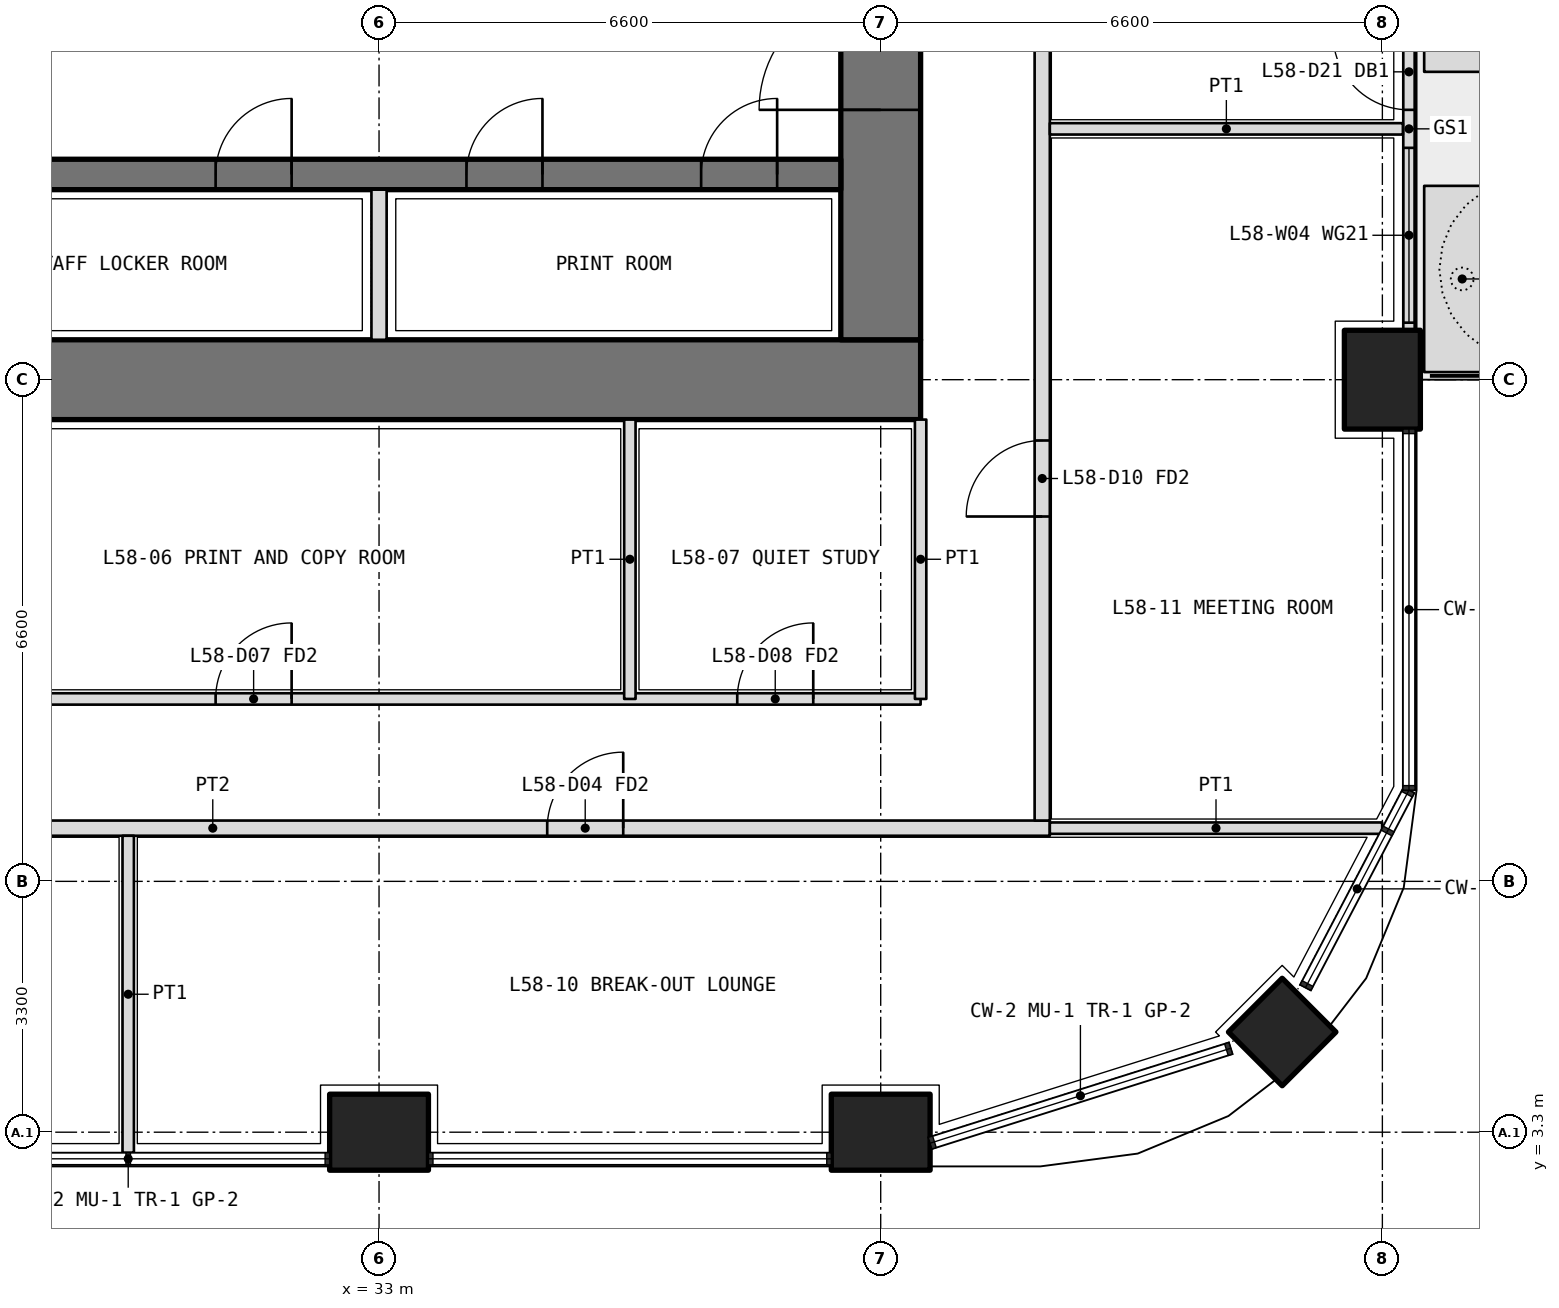
"""IFC4 building model, lengths in metres.
Left out: names, types, materials, properties, quantities, classifications, styles, units other than length and angle.
Written with IfcOpenShell. Run it as: python <this file> out.ifc"""

import sys

from ifc_helpers import new_model, si_unit, direction, frame, frame_2d, origin, origin_2d, place, context, subcontext, project, spatial, polyline, rectangle, outline, extrude, element, fill, save


model = new_model("IFC4")
c1 = context("Model", 3, precision=1e-05, world=origin(), true_north=direction((0.0, 1.0)))
c2 = subcontext(c1, "Body", "Model", "MODEL_VIEW")
j1 = project(units=[si_unit("LENGTHUNIT", "METRE"), si_unit("PLANEANGLEUNIT", "RADIAN")], contexts=[c1])
p1 = place(None, origin())
s1 = spatial("IfcSite", under=j1, at=p1, CompositionType="ELEMENT")
p2 = place(p1, origin())
s2 = spatial("IfcBuilding", under=s1, at=p2, CompositionType="ELEMENT")
p3 = place(p2, frame((0.0, 0.0, 254.4)))
s3 = spatial("IfcBuildingStorey", under=s2, at=p3, CompositionType="ELEMENT", Elevation=254.4)
p4 = place(p3, frame((44.882, 4.618, 0.0), z_axis=(0.0, 0.0, 1.0), x_axis=(0.707106781187, 0.707106781187, 0.0)))
e1 = element("IfcColumn", 1, at=p4, inside=s3, PredefinedType="COLUMN", context=c2, shape_type="SweptSolid", body=[
    extrude(rectangle(XDim=1.0, YDim=1.0, at=origin_2d()), origin(), (0.0, 0.0, 1.0), 4.2),
])
for number, where, z_axis, x_axis in (
    (2, (33.0, 3.3, 0.0), (0.0, 0.0, 1.0), (1.0, 0.0, 0.0)),
    (3, (39.6, 3.3, 0.0), (0.0, 0.0, 1.0), (1.0, 0.0, 0.0)),
    (4, (46.2, 13.2, 0.0), (0.0, 0.0, 1.0), (0.0, 1.0, 0.0)),
):
    element("IfcColumn", number, at=place(p3, frame(where, z_axis=z_axis, x_axis=x_axis)), inside=s3, PredefinedType="COLUMN", context=c2, shape_type="SweptSolid", body=[
        extrude(rectangle(XDim=1.3, YDim=1.0, at=origin_2d()), origin(), (0.0, 0.0, 1.0), 4.2),
    ])
p5 = place(p3, origin())
e5 = element("IfcWall", 5, at=p5, inside=s3, PredefinedType="USERDEFINED", context=c2, shape_type="SweptSolid", body=[
    extrude(outline(polyline([(46.75, 13.3), (47.75, 13.3), (47.75, 15.75), (46.75, 15.75), (46.75, 13.3)]), holes=[polyline([(46.9, 13.45), (47.6, 13.45), (47.6, 15.6), (46.9, 15.6), (46.9, 13.45)])]), origin(), (0.0, 0.0, 1.0), 1.05),
])
p6 = place(p3, origin())
e6 = element("IfcWall", 6, at=p6, inside=s3, PredefinedType="USERDEFINED", context=c2, shape_type="SweptSolid", body=[
    extrude(outline(polyline([(46.75, 17.25), (47.75, 17.25), (47.75, 26.3), (46.75, 26.3), (46.75, 17.25)]), holes=[polyline([(46.9, 17.4), (47.6, 17.4), (47.6, 26.15), (46.9, 26.15), (46.9, 17.4)])]), origin(), (0.0, 0.0, 1.0), 1.05),
])
p7 = place(p3, frame((46.55, 13.85, 0.0), z_axis=(0.0, 0.0, 1.0), x_axis=(0.0, 1.0, 0.0)))
e7 = element("IfcWall", 7, at=p7, inside=s3, PredefinedType="SOLIDWALL", context=c2, shape_type="SweptSolid", body=[
    extrude(rectangle(XDim=5.3, YDim=0.15, at=frame_2d((2.65, 0.0))), origin(), (0.0, 0.0, 1.0), 2.7),
])
p8 = place(p7, frame((2.9, 0.0, 0.0)))
e8 = element("IfcOpeningElement", 8, at=p8, cuts=e7, PredefinedType="OPENING", context=c2, shape_type="SweptSolid", body=[
    extrude(rectangle(XDim=1.0, YDim=2.4, at=frame_2d((0.5, 1.2))), frame((0.0, 0.085, 0.0), z_axis=(0.0, -1.0, 0.0), x_axis=(1.0, 0.0, 0.0)), (0.0, 0.0, 1.0), 0.17),
])
p9 = place(p7, frame((0.1, 0.0, 0.1)))
e9 = element("IfcOpeningElement", 9, at=p9, cuts=e7, PredefinedType="OPENING", context=c2, shape_type="SweptSolid", body=[
    extrude(rectangle(XDim=2.3, YDim=2.3, at=frame_2d((1.15, 1.15))), frame((0.0, 0.085, 0.0), z_axis=(0.0, -1.0, 0.0), x_axis=(1.0, 0.0, 0.0)), (0.0, 0.0, 1.0), 0.17),
])
p10 = place(p7, frame((4.0, 0.0, 0.1)))
e10 = element("IfcOpeningElement", 10, at=p10, cuts=e7, PredefinedType="OPENING", context=c2, shape_type="SweptSolid", body=[
    extrude(rectangle(XDim=1.2, YDim=2.3, at=frame_2d((0.6, 1.15))), frame((0.0, 0.085, 0.0), z_axis=(0.0, -1.0, 0.0), x_axis=(1.0, 0.0, 0.0)), (0.0, 0.0, 1.0), 0.17),
])
p11 = place(p3, frame((12.675, 13.2, 0.0), z_axis=(0.0, 0.0, 1.0), x_axis=(1.0, 0.0, 0.0)))
e11 = element("IfcWall", 11, at=p11, inside=s3, PredefinedType="SHEAR", context=c2, shape_type="SweptSolid", body=[
    extrude(rectangle(XDim=27.45, YDim=1.05, at=frame_2d((13.725, 0.0))), origin(), (0.0, 0.0, 1.0), 4.2),
])
p12 = place(p3, frame((39.6, 13.725, 0.0), z_axis=(0.0, 0.0, 1.0), x_axis=(0.0, 1.0, 0.0)))
e12 = element("IfcWall", 12, at=p12, inside=s3, PredefinedType="SHEAR", context=c2, shape_type="SweptSolid", body=[
    extrude(rectangle(XDim=18.75, YDim=1.05, at=frame_2d((9.375, 0.0))), origin(), (0.0, 0.0, 1.0), 4.2),
])
p13 = place(p12, frame((3.025, 0.0, 0.0)))
e13 = element("IfcOpeningElement", 13, at=p13, cuts=e12, PredefinedType="OPENING", context=c2, shape_type="SweptSolid", body=[
    extrude(rectangle(XDim=1.6, YDim=2.1, at=frame_2d((0.8, 1.05))), frame((0.0, 0.535, 0.0), z_axis=(0.0, -1.0, 0.0), x_axis=(1.0, 0.0, 0.0)), (0.0, 0.0, 1.0), 1.07),
])
p14 = place(p12, frame((13.825, 0.0, 0.0)))
e14 = element("IfcOpeningElement", 14, at=p14, cuts=e12, PredefinedType="OPENING", context=c2, shape_type="SweptSolid", body=[
    extrude(rectangle(XDim=1.6, YDim=2.1, at=frame_2d((0.8, 1.05))), frame((0.0, 0.535, 0.0), z_axis=(0.0, -1.0, 0.0), x_axis=(1.0, 0.0, 0.0)), (0.0, 0.0, 1.0), 1.07),
])
p15 = place(p3, frame((13.725, 15.9, 0.0), z_axis=(0.0, 0.0, 1.0), x_axis=(1.0, 0.0, 0.0)))
e15 = element("IfcWall", 15, at=p15, inside=s3, PredefinedType="SHEAR", context=c2, shape_type="SweptSolid", body=[
    extrude(rectangle(XDim=25.35, YDim=0.4, at=frame_2d((12.675, 0.0))), origin(), (0.0, 0.0, 1.0), 4.2),
])
p16 = place(p15, frame((0.837, 0.0, 0.0)))
e16 = element("IfcOpeningElement", 16, at=p16, cuts=e15, PredefinedType="OPENING", context=c2, shape_type="SweptSolid", body=[
    extrude(rectangle(XDim=1.0, YDim=2.1, at=frame_2d((0.5, 1.05))), frame((0.0, 0.21, 0.0), z_axis=(0.0, -1.0, 0.0), x_axis=(1.0, 0.0, 0.0)), (0.0, 0.0, 1.0), 0.42),
])
p17 = place(p15, frame((3.925, 0.0, 0.0)))
e17 = element("IfcOpeningElement", 17, at=p17, cuts=e15, PredefinedType="OPENING", context=c2, shape_type="SweptSolid", body=[
    extrude(rectangle(XDim=1.0, YDim=2.1, at=frame_2d((0.5, 1.05))), frame((0.0, 0.21, 0.0), z_axis=(0.0, -1.0, 0.0), x_axis=(1.0, 0.0, 0.0)), (0.0, 0.0, 1.0), 0.42),
])
p18 = place(p15, frame((7.225, 0.0, 0.0)))
e18 = element("IfcOpeningElement", 18, at=p18, cuts=e15, PredefinedType="OPENING", context=c2, shape_type="SweptSolid", body=[
    extrude(rectangle(XDim=1.0, YDim=2.1, at=frame_2d((0.5, 1.05))), frame((0.0, 0.21, 0.0), z_axis=(0.0, -1.0, 0.0), x_axis=(1.0, 0.0, 0.0)), (0.0, 0.0, 1.0), 0.42),
])
p19 = place(p15, frame((10.525, 0.0, 0.0)))
e19 = element("IfcOpeningElement", 19, at=p19, cuts=e15, PredefinedType="OPENING", context=c2, shape_type="SweptSolid", body=[
    extrude(rectangle(XDim=1.0, YDim=2.1, at=frame_2d((0.5, 1.05))), frame((0.0, 0.21, 0.0), z_axis=(0.0, -1.0, 0.0), x_axis=(1.0, 0.0, 0.0)), (0.0, 0.0, 1.0), 0.42),
])
p20 = place(p15, frame((13.825, 0.0, 0.0)))
e20 = element("IfcOpeningElement", 20, at=p20, cuts=e15, PredefinedType="OPENING", context=c2, shape_type="SweptSolid", body=[
    extrude(rectangle(XDim=1.0, YDim=2.1, at=frame_2d((0.5, 1.05))), frame((0.0, 0.21, 0.0), z_axis=(0.0, -1.0, 0.0), x_axis=(1.0, 0.0, 0.0)), (0.0, 0.0, 1.0), 0.42),
])
p21 = place(p15, frame((17.125, 0.0, 0.0)))
e21 = element("IfcOpeningElement", 21, at=p21, cuts=e15, PredefinedType="OPENING", context=c2, shape_type="SweptSolid", body=[
    extrude(rectangle(XDim=1.0, YDim=2.1, at=frame_2d((0.5, 1.05))), frame((0.0, 0.21, 0.0), z_axis=(0.0, -1.0, 0.0), x_axis=(1.0, 0.0, 0.0)), (0.0, 0.0, 1.0), 0.42),
])
p22 = place(p15, frame((20.425, 0.0, 0.0)))
e22 = element("IfcOpeningElement", 22, at=p22, cuts=e15, PredefinedType="OPENING", context=c2, shape_type="SweptSolid", body=[
    extrude(rectangle(XDim=1.0, YDim=2.1, at=frame_2d((0.5, 1.05))), frame((0.0, 0.21, 0.0), z_axis=(0.0, -1.0, 0.0), x_axis=(1.0, 0.0, 0.0)), (0.0, 0.0, 1.0), 0.42),
])
p23 = place(p15, frame((23.512, 0.0, 0.0)))
e23 = element("IfcOpeningElement", 23, at=p23, cuts=e15, PredefinedType="OPENING", context=c2, shape_type="SweptSolid", body=[
    extrude(rectangle(XDim=1.0, YDim=2.1, at=frame_2d((0.5, 1.05))), frame((0.0, 0.21, 0.0), z_axis=(0.0, -1.0, 0.0), x_axis=(1.0, 0.0, 0.0)), (0.0, 0.0, 1.0), 0.42),
])
p24 = place(p3, frame((33.0, 13.725, 0.0), z_axis=(0.0, 0.0, 1.0), x_axis=(0.0, 1.0, 0.0)))
e24 = element("IfcWall", 24, at=p24, inside=s3, PredefinedType="PARTITIONING", context=c2, shape_type="SweptSolid", body=[
    extrude(rectangle(XDim=1.975, YDim=0.2, at=frame_2d((0.987, 0.0))), origin(), (0.0, 0.0, 1.0), 4.2),
])
p25 = place(p3, frame((12.675, 9.0, 0.0), z_axis=(0.0, 0.0, 1.0), x_axis=(1.0, 0.0, 0.0)))
e25 = element("IfcWall", 25, at=p25, inside=s3, PredefinedType="PARTITIONING", context=c2, shape_type="SweptSolid", body=[
    extrude(rectangle(XDim=27.45, YDim=0.15, at=frame_2d((13.725, 0.0))), origin(), (0.0, 0.0, 1.0), 3.0),
])
p26 = place(p25, frame((4.712, 0.0, 0.0)))
e26 = element("IfcOpeningElement", 26, at=p26, cuts=e25, PredefinedType="OPENING", context=c2, shape_type="SweptSolid", body=[
    extrude(rectangle(XDim=1.0, YDim=2.1, at=frame_2d((0.5, 1.05))), frame((0.0, 0.085, 0.0), z_axis=(0.0, -1.0, 0.0), x_axis=(1.0, 0.0, 0.0)), (0.0, 0.0, 1.0), 0.17),
])
p27 = place(p25, frame((11.575, 0.0, 0.0)))
e27 = element("IfcOpeningElement", 27, at=p27, cuts=e25, PredefinedType="OPENING", context=c2, shape_type="SweptSolid", body=[
    extrude(rectangle(XDim=1.0, YDim=2.1, at=frame_2d((0.5, 1.05))), frame((0.0, 0.085, 0.0), z_axis=(0.0, -1.0, 0.0), x_axis=(1.0, 0.0, 0.0)), (0.0, 0.0, 1.0), 0.17),
])
p28 = place(p25, frame((18.175, 0.0, 0.0)))
e28 = element("IfcOpeningElement", 28, at=p28, cuts=e25, PredefinedType="OPENING", context=c2, shape_type="SweptSolid", body=[
    extrude(rectangle(XDim=1.0, YDim=2.1, at=frame_2d((0.5, 1.05))), frame((0.0, 0.085, 0.0), z_axis=(0.0, -1.0, 0.0), x_axis=(1.0, 0.0, 0.0)), (0.0, 0.0, 1.0), 0.17),
])
p29 = place(p25, frame((25.038, 0.0, 0.0)))
e29 = element("IfcOpeningElement", 29, at=p29, cuts=e25, PredefinedType="OPENING", context=c2, shape_type="SweptSolid", body=[
    extrude(rectangle(XDim=1.0, YDim=2.1, at=frame_2d((0.5, 1.05))), frame((0.0, 0.085, 0.0), z_axis=(0.0, -1.0, 0.0), x_axis=(1.0, 0.0, 0.0)), (0.0, 0.0, 1.0), 0.17),
])
p30 = place(p3, frame((40.125, 12.675, 0.0), z_axis=(0.0, 0.0, 1.0), x_axis=(0.0, -1.0, 0.0)))
e30 = element("IfcWall", 30, at=p30, inside=s3, PredefinedType="PARTITIONING", context=c2, shape_type="SweptSolid", body=[
    extrude(rectangle(XDim=3.675, YDim=0.15, at=frame_2d((1.837, 0.0))), origin(), (0.0, 0.0, 1.0), 3.0),
])
p31 = place(p3, frame((36.3, 12.675, 0.0), z_axis=(0.0, 0.0, 1.0), x_axis=(0.0, -1.0, 0.0)))
e31 = element("IfcWall", 31, at=p31, inside=s3, PredefinedType="PARTITIONING", context=c2, shape_type="SweptSolid", body=[
    extrude(rectangle(XDim=3.675, YDim=0.15, at=frame_2d((1.837, 0.0))), origin(), (0.0, 0.0, 1.0), 3.9),
])
p32 = place(p3, frame((19.8, 7.3, 0.0), z_axis=(0.0, 0.0, 1.0), x_axis=(1.0, 0.0, 0.0)))
e32 = element("IfcWall", 32, at=p32, inside=s3, PredefinedType="PARTITIONING", context=c2, shape_type="SweptSolid", body=[
    extrude(rectangle(XDim=22.025, YDim=0.2, at=frame_2d((11.012, 0.0))), origin(), (0.0, 0.0, 1.0), 3.0),
])
p33 = place(p32, frame((4.35, 0.0, 0.0)))
e33 = element("IfcOpeningElement", 33, at=p33, cuts=e32, PredefinedType="OPENING", context=c2, shape_type="SweptSolid", body=[
    extrude(rectangle(XDim=1.2, YDim=2.1, at=frame_2d((0.6, 1.05))), frame((0.0, 0.11, 0.0), z_axis=(0.0, -1.0, 0.0), x_axis=(1.0, 0.0, 0.0)), (0.0, 0.0, 1.0), 0.22),
])
p34 = place(p32, frame((15.413, 0.0, 0.0)))
e34 = element("IfcOpeningElement", 34, at=p34, cuts=e32, PredefinedType="OPENING", context=c2, shape_type="SweptSolid", body=[
    extrude(rectangle(XDim=1.0, YDim=2.1, at=frame_2d((0.5, 1.05))), frame((0.0, 0.11, 0.0), z_axis=(0.0, -1.0, 0.0), x_axis=(1.0, 0.0, 0.0)), (0.0, 0.0, 1.0), 0.22),
])
p35 = place(p3, frame((41.725, 7.4, 0.0), z_axis=(0.0, 0.0, 1.0), x_axis=(0.0, 1.0, 0.0)))
e35 = element("IfcWall", 35, at=p35, inside=s3, PredefinedType="PARTITIONING", context=c2, shape_type="SweptSolid", body=[
    extrude(rectangle(XDim=31.4, YDim=0.2, at=frame_2d((15.7, 0.0))), origin(), (0.0, 0.0, 1.0), 3.0),
])
p36 = place(p35, frame((4.0, 0.0, 0.0)))
e36 = element("IfcOpeningElement", 36, at=p36, cuts=e35, PredefinedType="OPENING", context=c2, shape_type="SweptSolid", body=[
    extrude(rectangle(XDim=1.0, YDim=2.1, at=frame_2d((0.5, 1.05))), frame((0.0, 0.11, 0.0), z_axis=(0.0, -1.0, 0.0), x_axis=(1.0, 0.0, 0.0)), (0.0, 0.0, 1.0), 0.22),
])
p37 = place(p35, frame((10.25, 0.0, 0.0)))
e37 = element("IfcOpeningElement", 37, at=p37, cuts=e35, PredefinedType="OPENING", context=c2, shape_type="SweptSolid", body=[
    extrude(rectangle(XDim=1.0, YDim=2.1, at=frame_2d((0.5, 1.05))), frame((0.0, 0.11, 0.0), z_axis=(0.0, -1.0, 0.0), x_axis=(1.0, 0.0, 0.0)), (0.0, 0.0, 1.0), 0.22),
])
p38 = place(p35, frame((13.4, 0.0, 0.0)))
e38 = element("IfcOpeningElement", 38, at=p38, cuts=e35, PredefinedType="OPENING", context=c2, shape_type="SweptSolid", body=[
    extrude(rectangle(XDim=1.0, YDim=2.1, at=frame_2d((0.5, 1.05))), frame((0.0, 0.11, 0.0), z_axis=(0.0, -1.0, 0.0), x_axis=(1.0, 0.0, 0.0)), (0.0, 0.0, 1.0), 0.22),
])
p39 = place(p35, frame((16.75, 0.0, 0.0)))
e39 = element("IfcOpeningElement", 39, at=p39, cuts=e35, PredefinedType="OPENING", context=c2, shape_type="SweptSolid", body=[
    extrude(rectangle(XDim=0.9, YDim=2.1, at=frame_2d((0.45, 1.05))), frame((0.0, 0.11, 0.0), z_axis=(0.0, -1.0, 0.0), x_axis=(1.0, 0.0, 0.0)), (0.0, 0.0, 1.0), 0.22),
])
p40 = place(p35, frame((20.05, 0.0, 0.0)))
e40 = element("IfcOpeningElement", 40, at=p40, cuts=e35, PredefinedType="OPENING", context=c2, shape_type="SweptSolid", body=[
    extrude(rectangle(XDim=1.2, YDim=2.1, at=frame_2d((0.6, 1.05))), frame((0.0, 0.11, 0.0), z_axis=(0.0, -1.0, 0.0), x_axis=(1.0, 0.0, 0.0)), (0.0, 0.0, 1.0), 0.22),
])
p41 = place(p35, frame((26.3, 0.0, 0.0)))
e41 = element("IfcOpeningElement", 41, at=p41, cuts=e35, PredefinedType="OPENING", context=c2, shape_type="SweptSolid", body=[
    extrude(rectangle(XDim=1.2, YDim=2.1, at=frame_2d((0.6, 1.05))), frame((0.0, 0.11, 0.0), z_axis=(0.0, -1.0, 0.0), x_axis=(1.0, 0.0, 0.0)), (0.0, 0.0, 1.0), 0.22),
])
p42 = place(p3, frame((46.198, 7.3, 0.0), z_axis=(0.0, 0.0, 1.0), x_axis=(-1.0, 0.0, 0.0)))
e42 = element("IfcWall", 42, at=p42, inside=s3, PredefinedType="PARTITIONING", context=c2, shape_type="SweptSolid", body=[
    extrude(rectangle(XDim=4.373, YDim=0.15, at=frame_2d((2.186, 0.0))), origin(), (0.0, 0.0, 1.0), 2.7),
])
p43 = place(p3, frame((29.7, 3.03, 0.0), z_axis=(0.0, 0.0, 1.0), x_axis=(0.0, 1.0, 0.0)))
e43 = element("IfcWall", 43, at=p43, inside=s3, PredefinedType="PARTITIONING", context=c2, shape_type="SweptSolid", body=[
    extrude(rectangle(XDim=4.17, YDim=0.15, at=frame_2d((2.085, 0.0))), origin(), (0.0, 0.0, 1.0), 2.7),
])
p44 = place(p3, frame((46.47, 16.5, 0.0), z_axis=(0.0, 0.0, 1.0), x_axis=(-1.0, 0.0, 0.0)))
e44 = element("IfcWall", 44, at=p44, inside=s3, PredefinedType="PARTITIONING", context=c2, shape_type="SweptSolid", body=[
    extrude(rectangle(XDim=4.645, YDim=0.15, at=frame_2d((2.323, 0.0))), origin(), (0.0, 0.0, 1.0), 2.7),
])
p45 = place(p8, origin())
e45 = element("IfcDoor", 45, at=p45, inside=s3, OperationType="SINGLE_SWING_RIGHT", PredefinedType="DOOR", context=c2, shape_type="SweptSolid", body=[
    extrude(rectangle(XDim=1.0, YDim=2.4, at=frame_2d((0.5, 1.2))), frame((0.0, 0.025, 0.0), z_axis=(0.0, -1.0, 0.0), x_axis=(1.0, 0.0, 0.0)), (0.0, 0.0, 1.0), 0.05),
])
fill(e8, e45)
p46 = place(p9, origin())
e46 = element("IfcWindow", 46, at=p46, inside=s3, PartitioningType="SINGLE_PANEL", PredefinedType="WINDOW", context=c2, shape_type="SweptSolid", body=[
    extrude(rectangle(XDim=2.3, YDim=2.3, at=frame_2d((1.15, 1.15))), frame((0.0, 0.03, 0.0), z_axis=(0.0, -1.0, 0.0), x_axis=(1.0, 0.0, 0.0)), (0.0, 0.0, 1.0), 0.06),
])
fill(e9, e46)
p47 = place(p28, origin())
e47 = element("IfcDoor", 47, at=p47, inside=s3, OperationType="SINGLE_SWING_RIGHT", PredefinedType="DOOR", context=c2, shape_type="SweptSolid", body=[
    extrude(rectangle(XDim=1.0, YDim=2.1, at=frame_2d((0.5, 1.05))), frame((0.0, 0.025, 0.0), z_axis=(0.0, -1.0, 0.0), x_axis=(1.0, 0.0, 0.0)), (0.0, 0.0, 1.0), 0.05),
])
fill(e28, e47)
p48 = place(p29, origin())
e48 = element("IfcDoor", 48, at=p48, inside=s3, OperationType="SINGLE_SWING_RIGHT", PredefinedType="DOOR", context=c2, shape_type="SweptSolid", body=[
    extrude(rectangle(XDim=1.0, YDim=2.1, at=frame_2d((0.5, 1.05))), frame((0.0, 0.025, 0.0), z_axis=(0.0, -1.0, 0.0), x_axis=(1.0, 0.0, 0.0)), (0.0, 0.0, 1.0), 0.05),
])
fill(e29, e48)
p49 = place(p34, origin())
e49 = element("IfcDoor", 49, at=p49, inside=s3, OperationType="SINGLE_SWING_RIGHT", PredefinedType="DOOR", context=c2, shape_type="SweptSolid", body=[
    extrude(rectangle(XDim=1.0, YDim=2.1, at=frame_2d((0.5, 1.05))), frame((0.0, 0.025, 0.0), z_axis=(0.0, -1.0, 0.0), x_axis=(1.0, 0.0, 0.0)), (0.0, 0.0, 1.0), 0.05),
])
fill(e34, e49)
p50 = place(p36, origin())
e50 = element("IfcDoor", 50, at=p50, inside=s3, OperationType="SINGLE_SWING_LEFT", PredefinedType="DOOR", context=c2, shape_type="SweptSolid", body=[
    extrude(rectangle(XDim=1.0, YDim=2.1, at=frame_2d((0.5, 1.05))), frame((0.0, 0.025, 0.0), z_axis=(0.0, -1.0, 0.0), x_axis=(1.0, 0.0, 0.0)), (0.0, 0.0, 1.0), 0.05),
])
fill(e36, e50)
p51 = place(p21, origin())
e51 = element("IfcDoor", 51, at=p51, inside=s3, OperationType="SINGLE_SWING_RIGHT", PredefinedType="DOOR", context=c2, shape_type="SweptSolid", body=[
    extrude(rectangle(XDim=1.0, YDim=2.1, at=frame_2d((0.5, 1.05))), frame((0.0, 0.025, 0.0), z_axis=(0.0, -1.0, 0.0), x_axis=(1.0, 0.0, 0.0)), (0.0, 0.0, 1.0), 0.05),
])
fill(e21, e51)
p52 = place(p22, origin())
e52 = element("IfcDoor", 52, at=p52, inside=s3, OperationType="SINGLE_SWING_RIGHT", PredefinedType="DOOR", context=c2, shape_type="SweptSolid", body=[
    extrude(rectangle(XDim=1.0, YDim=2.1, at=frame_2d((0.5, 1.05))), frame((0.0, 0.025, 0.0), z_axis=(0.0, -1.0, 0.0), x_axis=(1.0, 0.0, 0.0)), (0.0, 0.0, 1.0), 0.05),
])
fill(e22, e52)
p53 = place(p23, origin())
e53 = element("IfcDoor", 53, at=p53, inside=s3, OperationType="SINGLE_SWING_RIGHT", PredefinedType="DOOR", context=c2, shape_type="SweptSolid", body=[
    extrude(rectangle(XDim=1.0, YDim=2.1, at=frame_2d((0.5, 1.05))), frame((0.0, 0.025, 0.0), z_axis=(0.0, -1.0, 0.0), x_axis=(1.0, 0.0, 0.0)), (0.0, 0.0, 1.0), 0.05),
])
fill(e23, e53)
p54 = place(p13, origin())
e54 = element("IfcDoor", 54, at=p54, inside=s3, OperationType="DOUBLE_DOOR_DOUBLE_SWING", PredefinedType="DOOR", context=c2, shape_type="SweptSolid", body=[
    extrude(rectangle(XDim=1.6, YDim=2.1, at=frame_2d((0.8, 1.05))), frame((0.0, 0.025, 0.0), z_axis=(0.0, -1.0, 0.0), x_axis=(1.0, 0.0, 0.0)), (0.0, 0.0, 1.0), 0.05),
])
fill(e13, e54)
save(model, sys.argv[1])
